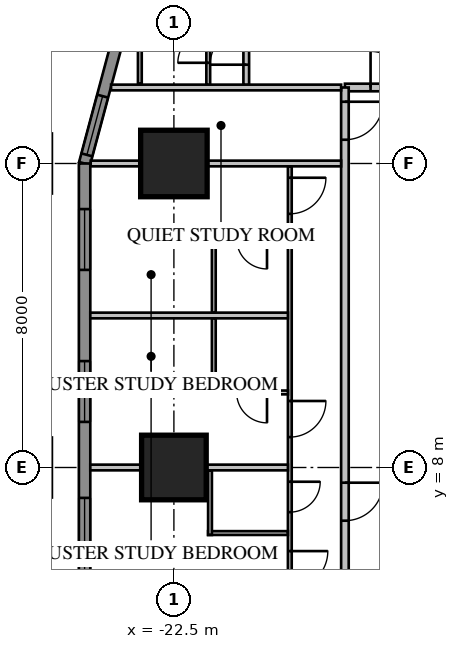
"""IFC4 building model, lengths in metres.
Left out: names, types, materials, properties, quantities, classifications, styles, units other than length and angle.
Written with IfcOpenShell. Run it as: python <this file> out.ifc"""

import sys

from ifc_helpers import new_model, si_unit, direction, frame, frame_2d, origin, origin_2d, place, context, subcontext, project, spatial, rectangle, extrude, element, fill, save


model = new_model("IFC4")
c1 = context("Model", 3, precision=1e-05, world=origin(), true_north=direction((0.0, 1.0)))
c2 = subcontext(c1, "Body", "Model", "MODEL_VIEW")
j1 = project(units=[si_unit("LENGTHUNIT", "METRE"), si_unit("PLANEANGLEUNIT", "RADIAN")], contexts=[c1])
p1 = place(None, origin())
s1 = spatial("IfcSite", under=j1, at=p1, CompositionType="ELEMENT")
p2 = place(p1, origin())
s2 = spatial("IfcBuilding", under=s1, at=p2, CompositionType="ELEMENT")
p3 = place(p2, frame((0.0, 0.0, 31.4)))
s3 = spatial("IfcBuildingStorey", under=s2, at=p3, CompositionType="ELEMENT", Elevation=31.4)
p4 = place(p3, frame((-22.5, 16.0, 0.0), z_axis=(0.0, 0.0, 1.0), x_axis=(1.0, 0.0, 0.0)))
e1 = element("IfcColumn", 1, at=p4, inside=s3, PredefinedType="COLUMN", context=c2, shape_type="SweptSolid", body=[
    extrude(rectangle(XDim=1.75, YDim=1.75, at=origin_2d()), origin(), (0.0, 0.0, 1.0), 3.85),
])
p5 = place(p3, frame((-22.5, 8.0, 0.0), z_axis=(0.0, 0.0, 1.0), x_axis=(1.0, 0.0, 0.0)))
e2 = element("IfcColumn", 2, at=p5, inside=s3, PredefinedType="COLUMN", context=c2, shape_type="SweptSolid", body=[
    extrude(rectangle(XDim=1.7, YDim=1.7, at=origin_2d()), origin(), (0.0, 0.0, 1.0), 3.85),
])
p6 = place(p3, frame((-23.664, 20.425, 0.0), z_axis=(0.0, 0.0, 1.0), x_axis=(-0.258839972501, -0.965920218567, 0.0)))
e3 = element("IfcWall", 3, at=p6, inside=s3, PredefinedType="SOLIDWALL", context=c2, shape_type="SweptSolid", body=[
    extrude(rectangle(XDim=4.581, YDim=0.3, at=frame_2d((2.291, 0.0))), origin(), (0.0, 0.0, 1.0), 3.65),
])
p7 = place(p6, frame((2.746, 0.0, 0.75)))
e4 = element("IfcOpeningElement", 4, at=p7, cuts=e3, PredefinedType="OPENING", context=c2, shape_type="SweptSolid", body=[
    extrude(rectangle(XDim=1.6, YDim=1.8, at=frame_2d((0.8, 0.9))), frame((0.0, 0.17, 0.0), z_axis=(0.0, -1.0, 0.0), x_axis=(1.0, 0.0, 0.0)), (0.0, 0.0, 1.0), 0.34),
])
p8 = place(p3, frame((-24.85, 16.0, 0.0), z_axis=(0.0, 0.0, 1.0), x_axis=(0.0, -1.0, 0.0)))
e5 = element("IfcWall", 5, at=p8, inside=s3, PredefinedType="SOLIDWALL", context=c2, shape_type="SweptSolid", body=[
    extrude(rectangle(XDim=32.0, YDim=0.3, at=frame_2d((16.0, 0.0))), origin(), (0.0, 0.0, 1.0), 3.65),
])
p9 = place(p8, frame((1.2, 0.0, 0.75)))
e6 = element("IfcOpeningElement", 6, at=p9, cuts=e5, PredefinedType="OPENING", context=c2, shape_type="SweptSolid", body=[
    extrude(rectangle(XDim=1.6, YDim=1.8, at=frame_2d((0.8, 0.9))), frame((0.0, 0.17, 0.0), z_axis=(0.0, -1.0, 0.0), x_axis=(1.0, 0.0, 0.0)), (0.0, 0.0, 1.0), 0.34),
])
p10 = place(p8, frame((5.2, 0.0, 0.75)))
e7 = element("IfcOpeningElement", 7, at=p10, cuts=e5, PredefinedType="OPENING", context=c2, shape_type="SweptSolid", body=[
    extrude(rectangle(XDim=1.6, YDim=1.8, at=frame_2d((0.8, 0.9))), frame((0.0, 0.17, 0.0), z_axis=(0.0, -1.0, 0.0), x_axis=(1.0, 0.0, 0.0)), (0.0, 0.0, 1.0), 0.34),
])
p11 = place(p8, frame((17.2, 0.0, 0.75)))
e8 = element("IfcOpeningElement", 8, at=p11, cuts=e5, PredefinedType="OPENING", context=c2, shape_type="SweptSolid", body=[
    extrude(rectangle(XDim=1.6, YDim=1.8, at=frame_2d((0.8, 0.9))), frame((0.0, 0.17, 0.0), z_axis=(0.0, -1.0, 0.0), x_axis=(1.0, 0.0, 0.0)), (0.0, 0.0, 1.0), 0.34),
])
p12 = place(p8, frame((21.2, 0.0, 0.75)))
e9 = element("IfcOpeningElement", 9, at=p12, cuts=e5, PredefinedType="OPENING", context=c2, shape_type="SweptSolid", body=[
    extrude(rectangle(XDim=1.6, YDim=1.8, at=frame_2d((0.8, 0.9))), frame((0.0, 0.17, 0.0), z_axis=(0.0, -1.0, 0.0), x_axis=(1.0, 0.0, 0.0)), (0.0, 0.0, 1.0), 0.34),
])
p13 = place(p8, frame((25.2, 0.0, 0.75)))
e10 = element("IfcOpeningElement", 10, at=p13, cuts=e5, PredefinedType="OPENING", context=c2, shape_type="SweptSolid", body=[
    extrude(rectangle(XDim=1.6, YDim=1.8, at=frame_2d((0.8, 0.9))), frame((0.0, 0.17, 0.0), z_axis=(0.0, -1.0, 0.0), x_axis=(1.0, 0.0, 0.0)), (0.0, 0.0, 1.0), 0.34),
])
p14 = place(p8, frame((29.2, 0.0, 0.75)))
e11 = element("IfcOpeningElement", 11, at=p14, cuts=e5, PredefinedType="OPENING", context=c2, shape_type="SweptSolid", body=[
    extrude(rectangle(XDim=1.6, YDim=1.8, at=frame_2d((0.8, 0.9))), frame((0.0, 0.17, 0.0), z_axis=(0.0, -1.0, 0.0), x_axis=(1.0, 0.0, 0.0)), (0.0, 0.0, 1.0), 0.34),
])
p15 = place(p8, frame((8.8, 0.0, 0.75)))
e12 = element("IfcOpeningElement", 12, at=p15, cuts=e5, PredefinedType="OPENING", context=c2, shape_type="SweptSolid", body=[
    extrude(rectangle(XDim=2.4, YDim=1.8, at=frame_2d((1.2, 0.9))), frame((0.0, 0.17, 0.0), z_axis=(0.0, -1.0, 0.0), x_axis=(1.0, 0.0, 0.0)), (0.0, 0.0, 1.0), 0.34),
])
p16 = place(p8, frame((13.812, 0.0, 0.0)))
e13 = element("IfcOpeningElement", 13, at=p16, cuts=e5, PredefinedType="OPENING", context=c2, shape_type="SweptSolid", body=[
    extrude(rectangle(XDim=1.0, YDim=2.4, at=frame_2d((0.5, 1.2))), frame((0.0, 0.17, 0.0), z_axis=(0.0, -1.0, 0.0), x_axis=(1.0, 0.0, 0.0)), (0.0, 0.0, 1.0), 0.34),
])
p17 = place(p3, frame((18.0, 18.0, 0.0), z_axis=(0.0, 0.0, 1.0), x_axis=(-1.0, 0.0, 0.0)))
e14 = element("IfcWall", 14, at=p17, inside=s3, PredefinedType="PARTITIONING", context=c2, shape_type="SweptSolid", body=[
    extrude(rectangle(XDim=36.0, YDim=0.2, at=frame_2d((18.0, 0.0))), origin(), (0.0, 0.0, 1.0), 3.65),
])
p18 = place(p17, frame((10.4, 0.0, 0.0)))
e15 = element("IfcOpeningElement", 15, at=p18, cuts=e14, PredefinedType="OPENING", context=c2, shape_type="SweptSolid", body=[
    extrude(rectangle(XDim=1.0, YDim=2.1, at=frame_2d((0.5, 1.05))), frame((0.0, 0.12, 0.0), z_axis=(0.0, -1.0, 0.0), x_axis=(1.0, 0.0, 0.0)), (0.0, 0.0, 1.0), 0.24),
])
p19 = place(p17, frame((0.375, 0.0, 0.0)))
e16 = element("IfcOpeningElement", 16, at=p19, cuts=e14, PredefinedType="OPENING", context=c2, shape_type="SweptSolid", body=[
    extrude(rectangle(XDim=1.0, YDim=2.1, at=frame_2d((0.5, 1.05))), frame((0.0, 0.12, 0.0), z_axis=(0.0, -1.0, 0.0), x_axis=(1.0, 0.0, 0.0)), (0.0, 0.0, 1.0), 0.24),
])
p20 = place(p17, frame((34.375, 0.0, 0.0)))
e17 = element("IfcOpeningElement", 17, at=p20, cuts=e14, PredefinedType="OPENING", context=c2, shape_type="SweptSolid", body=[
    extrude(rectangle(XDim=0.95, YDim=2.1, at=frame_2d((0.475, 1.05))), frame((0.0, 0.12, 0.0), z_axis=(0.0, -1.0, 0.0), x_axis=(1.0, 0.0, 0.0)), (0.0, 0.0, 1.0), 0.24),
])
p21 = place(p3, frame((-21.596, 18.065, 0.0), z_axis=(0.0, 0.0, 1.0), x_axis=(0.0, 1.0, 0.0)))
e18 = element("IfcWall", 18, at=p21, inside=s3, PredefinedType="PARTITIONING", context=c2, shape_type="SweptSolid", body=[
    extrude(rectangle(XDim=2.335, YDim=0.1, at=frame_2d((1.167, 0.0))), origin(), (0.0, 0.0, 1.0), 3.65),
])
p22 = place(p21, frame((0.585, 0.0, 0.0)))
e19 = element("IfcOpeningElement", 19, at=p22, cuts=e18, PredefinedType="OPENING", context=c2, shape_type="SweptSolid", body=[
    extrude(rectangle(XDim=0.8, YDim=2.1, at=frame_2d((0.4, 1.05))), frame((0.0, 0.07, 0.0), z_axis=(0.0, -1.0, 0.0), x_axis=(1.0, 0.0, 0.0)), (0.0, 0.0, 1.0), 0.14),
])
p23 = place(p3, frame((-23.396, 18.1, 0.0), z_axis=(0.0, 0.0, 1.0), x_axis=(0.0, 1.0, 0.0)))
e20 = element("IfcWall", 20, at=p23, inside=s3, PredefinedType="PARTITIONING", context=c2, shape_type="SweptSolid", body=[
    extrude(rectangle(XDim=2.3, YDim=0.1, at=frame_2d((1.15, 0.0))), origin(), (0.0, 0.0, 1.0), 3.65),
])
p24 = place(p3, frame((-20.596, 18.065, 0.0), z_axis=(0.0, 0.0, 1.0), x_axis=(0.0, 1.0, 0.0)))
e21 = element("IfcWall", 21, at=p24, inside=s3, PredefinedType="PARTITIONING", context=c2, shape_type="SweptSolid", body=[
    extrude(rectangle(XDim=5.209, YDim=0.15, at=frame_2d((2.604, 0.0))), origin(), (0.0, 0.0, 1.0), 3.65),
])
p25 = place(p24, frame((0.535, 0.0, 0.0)))
e22 = element("IfcOpeningElement", 22, at=p25, cuts=e21, PredefinedType="OPENING", context=c2, shape_type="SweptSolid", body=[
    extrude(rectangle(XDim=0.95, YDim=2.1, at=frame_2d((0.475, 1.05))), frame((0.0, 0.095, 0.0), z_axis=(0.0, -1.0, 0.0), x_axis=(1.0, 0.0, 0.0)), (0.0, 0.0, 1.0), 0.19),
])
p26 = place(p3, frame((-18.0, 18.0, 0.0), z_axis=(0.0, 0.0, 1.0), x_axis=(0.0, -1.0, 0.0)))
e23 = element("IfcWall", 23, at=p26, inside=s3, PredefinedType="PARTITIONING", context=c2, shape_type="SweptSolid", body=[
    extrude(rectangle(XDim=36.0, YDim=0.2, at=frame_2d((18.0, 0.0))), origin(), (0.0, 0.0, 1.0), 3.65),
])
p27 = place(p26, frame((10.4, 0.0, 0.0)))
e24 = element("IfcOpeningElement", 24, at=p27, cuts=e23, PredefinedType="OPENING", context=c2, shape_type="SweptSolid", body=[
    extrude(rectangle(XDim=1.0, YDim=2.1, at=frame_2d((0.5, 1.05))), frame((0.0, 0.12, 0.0), z_axis=(0.0, -1.0, 0.0), x_axis=(1.0, 0.0, 0.0)), (0.0, 0.0, 1.0), 0.24),
])
p28 = place(p26, frame((0.375, 0.0, 0.0)))
e25 = element("IfcOpeningElement", 25, at=p28, cuts=e23, PredefinedType="OPENING", context=c2, shape_type="SweptSolid", body=[
    extrude(rectangle(XDim=1.0, YDim=2.1, at=frame_2d((0.5, 1.05))), frame((0.0, 0.12, 0.0), z_axis=(0.0, -1.0, 0.0), x_axis=(1.0, 0.0, 0.0)), (0.0, 0.0, 1.0), 0.24),
])
p29 = place(p26, frame((34.375, 0.0, 0.0)))
e26 = element("IfcOpeningElement", 26, at=p29, cuts=e23, PredefinedType="OPENING", context=c2, shape_type="SweptSolid", body=[
    extrude(rectangle(XDim=0.95, YDim=2.1, at=frame_2d((0.475, 1.05))), frame((0.0, 0.12, 0.0), z_axis=(0.0, -1.0, 0.0), x_axis=(1.0, 0.0, 0.0)), (0.0, 0.0, 1.0), 0.24),
])
p30 = place(p3, frame((-19.45, 15.925, 0.0), z_axis=(0.0, 0.0, 1.0), x_axis=(0.0, -1.0, 0.0)))
e27 = element("IfcWall", 27, at=p30, inside=s3, PredefinedType="PARTITIONING", context=c2, shape_type="SweptSolid", body=[
    extrude(rectangle(XDim=31.85, YDim=0.1, at=frame_2d((15.925, 0.0))), origin(), (0.0, 0.0, 1.0), 3.65),
])
p31 = place(p30, frame((10.125, 0.0, 0.0)))
e28 = element("IfcOpeningElement", 28, at=p31, cuts=e27, PredefinedType="OPENING", context=c2, shape_type="SweptSolid", body=[
    extrude(rectangle(XDim=1.0, YDim=2.1, at=frame_2d((0.5, 1.05))), frame((0.0, 0.07, 0.0), z_axis=(0.0, -1.0, 0.0), x_axis=(1.0, 0.0, 0.0)), (0.0, 0.0, 1.0), 0.14),
])
p32 = place(p30, frame((8.3, 0.0, 0.0)))
e29 = element("IfcOpeningElement", 29, at=p32, cuts=e27, PredefinedType="OPENING", context=c2, shape_type="SweptSolid", body=[
    extrude(rectangle(XDim=0.8, YDim=2.1, at=frame_2d((0.4, 1.05))), frame((0.0, 0.07, 0.0), z_axis=(0.0, -1.0, 0.0), x_axis=(1.0, 0.0, 0.0)), (0.0, 0.0, 1.0), 0.14),
])
p33 = place(p30, frame((0.3, 0.0, 0.0)))
e30 = element("IfcOpeningElement", 30, at=p33, cuts=e27, PredefinedType="OPENING", context=c2, shape_type="SweptSolid", body=[
    extrude(rectangle(XDim=0.95, YDim=2.1, at=frame_2d((0.475, 1.05))), frame((0.0, 0.07, 0.0), z_axis=(0.0, -1.0, 0.0), x_axis=(1.0, 0.0, 0.0)), (0.0, 0.0, 1.0), 0.14),
])
p34 = place(p30, frame((6.175, 0.0, 0.0)))
e31 = element("IfcOpeningElement", 31, at=p34, cuts=e27, PredefinedType="OPENING", context=c2, shape_type="SweptSolid", body=[
    extrude(rectangle(XDim=0.95, YDim=2.1, at=frame_2d((0.475, 1.05))), frame((0.0, 0.07, 0.0), z_axis=(0.0, -1.0, 0.0), x_axis=(1.0, 0.0, 0.0)), (0.0, 0.0, 1.0), 0.14),
])
p35 = place(p30, frame((16.3, 0.0, 0.0)))
e32 = element("IfcOpeningElement", 32, at=p35, cuts=e27, PredefinedType="OPENING", context=c2, shape_type="SweptSolid", body=[
    extrude(rectangle(XDim=0.95, YDim=2.1, at=frame_2d((0.475, 1.05))), frame((0.0, 0.07, 0.0), z_axis=(0.0, -1.0, 0.0), x_axis=(1.0, 0.0, 0.0)), (0.0, 0.0, 1.0), 0.14),
])
p36 = place(p30, frame((22.175, 0.0, 0.0)))
e33 = element("IfcOpeningElement", 33, at=p36, cuts=e27, PredefinedType="OPENING", context=c2, shape_type="SweptSolid", body=[
    extrude(rectangle(XDim=0.95, YDim=2.1, at=frame_2d((0.475, 1.05))), frame((0.0, 0.07, 0.0), z_axis=(0.0, -1.0, 0.0), x_axis=(1.0, 0.0, 0.0)), (0.0, 0.0, 1.0), 0.14),
])
p37 = place(p30, frame((24.3, 0.0, 0.0)))
e34 = element("IfcOpeningElement", 34, at=p37, cuts=e27, PredefinedType="OPENING", context=c2, shape_type="SweptSolid", body=[
    extrude(rectangle(XDim=0.95, YDim=2.1, at=frame_2d((0.475, 1.05))), frame((0.0, 0.07, 0.0), z_axis=(0.0, -1.0, 0.0), x_axis=(1.0, 0.0, 0.0)), (0.0, 0.0, 1.0), 0.14),
])
p38 = place(p30, frame((30.175, 0.0, 0.0)))
e35 = element("IfcOpeningElement", 35, at=p38, cuts=e27, PredefinedType="OPENING", context=c2, shape_type="SweptSolid", body=[
    extrude(rectangle(XDim=0.95, YDim=2.1, at=frame_2d((0.475, 1.05))), frame((0.0, 0.07, 0.0), z_axis=(0.0, -1.0, 0.0), x_axis=(1.0, 0.0, 0.0)), (0.0, 0.0, 1.0), 0.14),
])
p39 = place(p3, frame((-19.5, 6.275, 0.0), z_axis=(0.0, 0.0, 1.0), x_axis=(-1.0, 0.0, 0.0)))
e36 = element("IfcWall", 36, at=p39, inside=s3, PredefinedType="PARTITIONING", context=c2, shape_type="SweptSolid", body=[
    extrude(rectangle(XDim=2.1, YDim=0.1, at=frame_2d((1.05, 0.0))), origin(), (0.0, 0.0, 1.0), 3.65),
])
p40 = place(p3, frame((-21.55, 7.925, 0.0), z_axis=(0.0, 0.0, 1.0), x_axis=(0.0, -1.0, 0.0)))
e37 = element("IfcWall", 37, at=p40, inside=s3, PredefinedType="PARTITIONING", context=c2, shape_type="SweptSolid", body=[
    extrude(rectangle(XDim=1.7, YDim=0.1, at=frame_2d((0.85, 0.0))), origin(), (0.0, 0.0, 1.0), 3.65),
])
p41 = place(p3, frame((-18.1, 18.0, 0.0), z_axis=(0.0, 0.0, 1.0), x_axis=(-1.0, 0.0, 0.0)))
e38 = element("IfcWall", 38, at=p41, inside=s3, PredefinedType="PARTITIONING", context=c2, shape_type="SweptSolid", body=[
    extrude(rectangle(XDim=6.053, YDim=0.15, at=frame_2d((3.027, 0.0))), origin(), (0.0, 0.0, 1.0), 3.65),
])
p42 = place(p3, frame((-18.1, 16.0, 0.0), z_axis=(0.0, 0.0, 1.0), x_axis=(-1.0, 0.0, 0.0)))
e39 = element("IfcWall", 39, at=p42, inside=s3, PredefinedType="PARTITIONING", context=c2, shape_type="SweptSolid", body=[
    extrude(rectangle(XDim=6.589, YDim=0.15, at=frame_2d((3.295, 0.0))), origin(), (0.0, 0.0, 1.0), 3.65),
])
for number, where, z_axis, x_axis in (
    (40, (-19.5, 12.0, 0.0), (0.0, 0.0, 1.0), (-1.0, 0.0, 0.0)),
    (41, (-19.5, 8.0, 0.0), (0.0, 0.0, 1.0), (-1.0, 0.0, 0.0)),
):
    element("IfcWall", number, at=place(p3, frame(where, z_axis=z_axis, x_axis=x_axis)), inside=s3, PredefinedType="PARTITIONING", context=c2, shape_type="SweptSolid", body=[
        extrude(rectangle(XDim=5.2, YDim=0.15, at=frame_2d((2.6, 0.0))), origin(), (0.0, 0.0, 1.0), 3.65),
    ])
p43 = place(p3, frame((-19.5, 14.025, 0.0), z_axis=(0.0, 0.0, 1.0), x_axis=(-1.0, 0.0, 0.0)))
e42 = element("IfcWall", 42, at=p43, inside=s3, PredefinedType="PARTITIONING", context=c2, shape_type="SweptSolid", body=[
    extrude(rectangle(XDim=2.0, YDim=0.1, at=frame_2d((1.0, 0.0))), origin(), (0.0, 0.0, 1.0), 3.65),
])
p44 = place(p43, frame((0.55, 0.0, 0.0)))
e43 = element("IfcOpeningElement", 43, at=p44, cuts=e42, PredefinedType="OPENING", context=c2, shape_type="SweptSolid", body=[
    extrude(rectangle(XDim=0.8, YDim=2.1, at=frame_2d((0.4, 1.05))), frame((0.0, 0.07, 0.0), z_axis=(0.0, -1.0, 0.0), x_axis=(1.0, 0.0, 0.0)), (0.0, 0.0, 1.0), 0.14),
])
p45 = place(p3, frame((-21.45, 13.975, 0.0), z_axis=(0.0, 0.0, 1.0), x_axis=(0.0, -1.0, 0.0)))
e44 = element("IfcWall", 44, at=p45, inside=s3, PredefinedType="PARTITIONING", context=c2, shape_type="SweptSolid", body=[
    extrude(rectangle(XDim=1.9, YDim=0.1, at=frame_2d((0.95, 0.0))), origin(), (0.0, 0.0, 1.0), 3.65),
])
p46 = place(p3, frame((-19.5, 9.975, 0.0), z_axis=(0.0, 0.0, 1.0), x_axis=(-1.0, 0.0, 0.0)))
e45 = element("IfcWall", 45, at=p46, inside=s3, PredefinedType="PARTITIONING", context=c2, shape_type="SweptSolid", body=[
    extrude(rectangle(XDim=2.0, YDim=0.1, at=frame_2d((1.0, 0.0))), origin(), (0.0, 0.0, 1.0), 3.65),
])
p47 = place(p46, frame((0.55, 0.0, 0.0)))
e46 = element("IfcOpeningElement", 46, at=p47, cuts=e45, PredefinedType="OPENING", context=c2, shape_type="SweptSolid", body=[
    extrude(rectangle(XDim=0.8, YDim=2.1, at=frame_2d((0.4, 1.05))), frame((0.0, 0.07, 0.0), z_axis=(0.0, -1.0, 0.0), x_axis=(1.0, 0.0, 0.0)), (0.0, 0.0, 1.0), 0.14),
])
p48 = place(p3, frame((-21.45, 11.925, 0.0), z_axis=(0.0, 0.0, 1.0), x_axis=(0.0, -1.0, 0.0)))
e47 = element("IfcWall", 47, at=p48, inside=s3, PredefinedType="PARTITIONING", context=c2, shape_type="SweptSolid", body=[
    extrude(rectangle(XDim=1.9, YDim=0.1, at=frame_2d((0.95, 0.0))), origin(), (0.0, 0.0, 1.0), 3.65),
])
p49 = place(p7, origin())
e48 = element("IfcWindow", 48, at=p49, inside=s3, PartitioningType="SINGLE_PANEL", PredefinedType="WINDOW", context=c2, shape_type="SweptSolid", body=[
    extrude(rectangle(XDim=1.6, YDim=1.8, at=frame_2d((0.8, 0.9))), frame((0.0, 0.03, 0.0), z_axis=(0.0, -1.0, 0.0), x_axis=(1.0, 0.0, 0.0)), (0.0, 0.0, 1.0), 0.06),
])
fill(e4, e48)
p50 = place(p9, origin())
e49 = element("IfcWindow", 49, at=p50, inside=s3, PartitioningType="SINGLE_PANEL", PredefinedType="WINDOW", context=c2, shape_type="SweptSolid", body=[
    extrude(rectangle(XDim=1.6, YDim=1.8, at=frame_2d((0.8, 0.9))), frame((0.0, 0.03, 0.0), z_axis=(0.0, -1.0, 0.0), x_axis=(1.0, 0.0, 0.0)), (0.0, 0.0, 1.0), 0.06),
])
fill(e6, e49)
p51 = place(p10, origin())
e50 = element("IfcWindow", 50, at=p51, inside=s3, PartitioningType="SINGLE_PANEL", PredefinedType="WINDOW", context=c2, shape_type="SweptSolid", body=[
    extrude(rectangle(XDim=1.6, YDim=1.8, at=frame_2d((0.8, 0.9))), frame((0.0, 0.03, 0.0), z_axis=(0.0, -1.0, 0.0), x_axis=(1.0, 0.0, 0.0)), (0.0, 0.0, 1.0), 0.06),
])
fill(e7, e50)
p52 = place(p15, origin())
e51 = element("IfcWindow", 51, at=p52, inside=s3, PartitioningType="SINGLE_PANEL", PredefinedType="WINDOW", context=c2, shape_type="SweptSolid", body=[
    extrude(rectangle(XDim=2.4, YDim=1.8, at=frame_2d((1.2, 0.9))), frame((0.0, 0.03, 0.0), z_axis=(0.0, -1.0, 0.0), x_axis=(1.0, 0.0, 0.0)), (0.0, 0.0, 1.0), 0.06),
])
fill(e12, e51)
p53 = place(p20, origin())
e52 = element("IfcDoor", 52, at=p53, inside=s3, OperationType="SINGLE_SWING_RIGHT", PredefinedType="DOOR", context=c2, shape_type="SweptSolid", body=[
    extrude(rectangle(XDim=0.95, YDim=2.1, at=frame_2d((0.475, 1.05))), frame((0.0, 0.025, 0.0), z_axis=(0.0, -1.0, 0.0), x_axis=(1.0, 0.0, 0.0)), (0.0, 0.0, 1.0), 0.05),
])
fill(e17, e52)
p54 = place(p22, origin())
e53 = element("IfcDoor", 53, at=p54, inside=s3, OperationType="SINGLE_SWING_LEFT", PredefinedType="DOOR", context=c2, shape_type="SweptSolid", body=[
    extrude(rectangle(XDim=0.8, YDim=2.1, at=frame_2d((0.4, 1.05))), frame((0.0, 0.025, 0.0), z_axis=(0.0, -1.0, 0.0), x_axis=(1.0, 0.0, 0.0)), (0.0, 0.0, 1.0), 0.05),
])
fill(e19, e53)
p55 = place(p25, origin())
e54 = element("IfcDoor", 54, at=p55, inside=s3, OperationType="SINGLE_SWING_LEFT", PredefinedType="DOOR", context=c2, shape_type="SweptSolid", body=[
    extrude(rectangle(XDim=0.95, YDim=2.1, at=frame_2d((0.475, 1.05))), frame((0.0, 0.025, 0.0), z_axis=(0.0, -1.0, 0.0), x_axis=(1.0, 0.0, 0.0)), (0.0, 0.0, 1.0), 0.05),
])
fill(e22, e54)
p56 = place(p27, origin())
e55 = element("IfcDoor", 55, at=p56, inside=s3, OperationType="SINGLE_SWING_LEFT", PredefinedType="DOOR", context=c2, shape_type="SweptSolid", body=[
    extrude(rectangle(XDim=1.0, YDim=2.1, at=frame_2d((0.5, 1.05))), frame((0.0, 0.025, 0.0), z_axis=(0.0, -1.0, 0.0), x_axis=(1.0, 0.0, 0.0)), (0.0, 0.0, 1.0), 0.05),
])
fill(e24, e55)
p57 = place(p31, origin())
e56 = element("IfcDoor", 56, at=p57, inside=s3, OperationType="SINGLE_SWING_LEFT", PredefinedType="DOOR", context=c2, shape_type="SweptSolid", body=[
    extrude(rectangle(XDim=1.0, YDim=2.1, at=frame_2d((0.5, 1.05))), frame((0.0, 0.025, 0.0), z_axis=(0.0, -1.0, 0.0), x_axis=(1.0, 0.0, 0.0)), (0.0, 0.0, 1.0), 0.05),
])
fill(e28, e56)
p58 = place(p32, origin())
e57 = element("IfcDoor", 57, at=p58, inside=s3, OperationType="SINGLE_SWING_LEFT", PredefinedType="DOOR", context=c2, shape_type="SweptSolid", body=[
    extrude(rectangle(XDim=0.8, YDim=2.1, at=frame_2d((0.4, 1.05))), frame((0.0, 0.025, 0.0), z_axis=(0.0, -1.0, 0.0), x_axis=(1.0, 0.0, 0.0)), (0.0, 0.0, 1.0), 0.05),
])
fill(e29, e57)
p59 = place(p28, origin())
e58 = element("IfcDoor", 58, at=p59, inside=s3, OperationType="SINGLE_SWING_LEFT", PredefinedType="DOOR", context=c2, shape_type="SweptSolid", body=[
    extrude(rectangle(XDim=1.0, YDim=2.1, at=frame_2d((0.5, 1.05))), frame((0.0, 0.025, 0.0), z_axis=(0.0, -1.0, 0.0), x_axis=(1.0, 0.0, 0.0)), (0.0, 0.0, 1.0), 0.05),
])
fill(e25, e58)
p60 = place(p33, origin())
e59 = element("IfcDoor", 59, at=p60, inside=s3, OperationType="SINGLE_SWING_LEFT", PredefinedType="DOOR", context=c2, shape_type="SweptSolid", body=[
    extrude(rectangle(XDim=0.95, YDim=2.1, at=frame_2d((0.475, 1.05))), frame((0.0, 0.025, 0.0), z_axis=(0.0, -1.0, 0.0), x_axis=(1.0, 0.0, 0.0)), (0.0, 0.0, 1.0), 0.05),
])
fill(e30, e59)
p61 = place(p44, origin())
e60 = element("IfcDoor", 60, at=p61, inside=s3, OperationType="SINGLE_SWING_LEFT", PredefinedType="DOOR", context=c2, shape_type="SweptSolid", body=[
    extrude(rectangle(XDim=0.8, YDim=2.1, at=frame_2d((0.4, 1.05))), frame((0.0, 0.025, 0.0), z_axis=(0.0, -1.0, 0.0), x_axis=(1.0, 0.0, 0.0)), (0.0, 0.0, 1.0), 0.05),
])
fill(e43, e60)
p62 = place(p34, origin())
e61 = element("IfcDoor", 61, at=p62, inside=s3, OperationType="SINGLE_SWING_LEFT", PredefinedType="DOOR", context=c2, shape_type="SweptSolid", body=[
    extrude(rectangle(XDim=0.95, YDim=2.1, at=frame_2d((0.475, 1.05))), frame((0.0, 0.025, 0.0), z_axis=(0.0, -1.0, 0.0), x_axis=(1.0, 0.0, 0.0)), (0.0, 0.0, 1.0), 0.05),
])
fill(e31, e61)
p63 = place(p47, origin())
e62 = element("IfcDoor", 62, at=p63, inside=s3, OperationType="SINGLE_SWING_LEFT", PredefinedType="DOOR", context=c2, shape_type="SweptSolid", body=[
    extrude(rectangle(XDim=0.8, YDim=2.1, at=frame_2d((0.4, 1.05))), frame((0.0, 0.025, 0.0), z_axis=(0.0, -1.0, 0.0), x_axis=(1.0, 0.0, 0.0)), (0.0, 0.0, 1.0), 0.05),
])
fill(e46, e62)
save(model, sys.argv[1])
